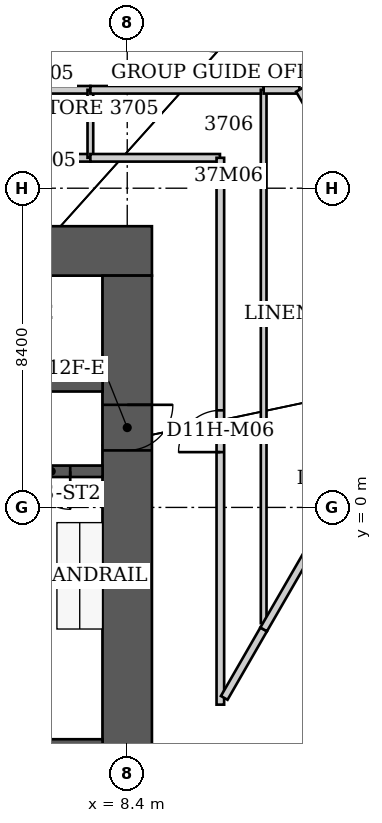
"""IFC4 building model, lengths in metres.
Left out: names, types, materials, properties, quantities, classifications, styles, units other than length and angle.
Written with IfcOpenShell. Run it as: python <this file> out.ifc"""

import sys

from ifc_helpers import new_model, si_unit, direction, frame, frame_2d, origin, place, context, subcontext, project, spatial, rectangle, extrude, element, fill, save


model = new_model("IFC4")
c1 = context("Model", 3, precision=1e-05, world=origin(), true_north=direction((0.0, 1.0)))
c2 = subcontext(c1, "Body", "Model", "MODEL_VIEW")
j1 = project(units=[si_unit("LENGTHUNIT", "METRE"), si_unit("PLANEANGLEUNIT", "RADIAN")], contexts=[c1])
p1 = place(None, origin())
s1 = spatial("IfcSite", under=j1, at=p1, CompositionType="ELEMENT")
p2 = place(p1, origin())
s2 = spatial("IfcBuilding", under=s1, at=p2, CompositionType="ELEMENT")
p3 = place(p2, frame((0.0, 0.0, 150.0)))
s3 = spatial("IfcBuildingStorey", under=s2, at=p3, CompositionType="ELEMENT", Elevation=150.0)
p4 = place(p3, frame((-9.05, 6.75, 0.0), z_axis=(0.0, 0.0, 1.0), x_axis=(1.0, 0.0, 0.0)))
e1 = element("IfcWall", 1, at=p4, inside=s3, PredefinedType="SHEAR", context=c2, shape_type="SweptSolid", body=[
    extrude(rectangle(XDim=18.1, YDim=1.3, at=frame_2d((9.05, 0.0))), origin(), (0.0, 0.0, 1.0), 3.8),
])
p5 = place(p3, frame((8.4, -9.2, 0.0), z_axis=(0.0, 0.0, 1.0), x_axis=(0.0, 1.0, 0.0)))
e2 = element("IfcWall", 2, at=p5, inside=s3, PredefinedType="SHEAR", context=c2, shape_type="SweptSolid", body=[
    extrude(rectangle(XDim=15.3, YDim=1.3, at=frame_2d((7.65, 0.0))), origin(), (0.0, 0.0, 1.0), 3.8),
])
p6 = place(p5, frame((10.7, 0.0, 0.0)))
e3 = element("IfcOpeningElement", 3, at=p6, cuts=e2, PredefinedType="OPENING", context=c2, shape_type="SweptSolid", body=[
    extrude(rectangle(XDim=1.2, YDim=2.2, at=frame_2d((0.6, 1.1))), frame((0.0, 0.65, 0.0), z_axis=(0.0, -1.0, 0.0), x_axis=(1.0, 0.0, 0.0)), (0.0, 0.0, 1.0), 1.3),
])
p7 = place(p3, frame((-7.75, -6.5, 0.0), z_axis=(0.0, 0.0, 1.0), x_axis=(1.0, 0.0, 0.0)))
e4 = element("IfcWall", 4, at=p7, inside=s3, PredefinedType="SHEAR", context=c2, shape_type="SweptSolid", body=[
    extrude(rectangle(XDim=15.5, YDim=0.8, at=frame_2d((7.75, 0.0))), origin(), (0.0, 0.0, 1.0), 3.8),
])
p8 = place(p3, frame((4.75, 0.95, 0.0), z_axis=(0.0, 0.0, 1.0), x_axis=(1.0, 0.0, 0.0)))
e5 = element("IfcWall", 5, at=p8, inside=s3, PredefinedType="SHEAR", context=c2, shape_type="SweptSolid", body=[
    extrude(rectangle(XDim=3.0, YDim=0.3, at=frame_2d((1.5, 0.0))), origin(), (0.0, 0.0, 1.0), 3.8),
])
p9 = place(p8, frame((1.15, 0.0, 0.0)))
e6 = element("IfcOpeningElement", 6, at=p9, cuts=e5, PredefinedType="OPENING", context=c2, shape_type="SweptSolid", body=[
    extrude(rectangle(XDim=1.0, YDim=2.2, at=frame_2d((0.5, 1.1))), frame((0.0, 0.15, 0.0), z_axis=(0.0, -1.0, 0.0), x_axis=(1.0, 0.0, 0.0)), (0.0, 0.0, 1.0), 0.3),
])
p10 = place(p3, frame((-7.75, 3.2, 0.0), z_axis=(0.0, 0.0, 1.0), x_axis=(1.0, 0.0, 0.0)))
e7 = element("IfcWall", 7, at=p10, inside=s3, PredefinedType="SHEAR", context=c2, shape_type="SweptSolid", body=[
    extrude(rectangle(XDim=15.5, YDim=0.3, at=frame_2d((7.75, 0.0))), origin(), (0.0, 0.0, 1.0), 3.8),
])
p11 = place(p10, frame((5.944, 0.0, 0.0)))
e8 = element("IfcOpeningElement", 8, at=p11, cuts=e7, PredefinedType="OPENING", context=c2, shape_type="SweptSolid", body=[
    extrude(rectangle(XDim=1.1, YDim=2.2, at=frame_2d((0.55, 1.1))), frame((0.0, 0.15, 0.0), z_axis=(0.0, -1.0, 0.0), x_axis=(1.0, 0.0, 0.0)), (0.0, 0.0, 1.0), 0.3),
])
p12 = place(p10, frame((11.144, 0.0, 0.0)))
e9 = element("IfcOpeningElement", 9, at=p12, cuts=e7, PredefinedType="OPENING", context=c2, shape_type="SweptSolid", body=[
    extrude(rectangle(XDim=1.1, YDim=2.2, at=frame_2d((0.55, 1.1))), frame((0.0, 0.15, 0.0), z_axis=(0.0, -1.0, 0.0), x_axis=(1.0, 0.0, 0.0)), (0.0, 0.0, 1.0), 0.3),
])
p13 = place(p3, frame((2.86, 10.99, 0.0), z_axis=(0.0, 0.0, 1.0), x_axis=(1.0, 0.0, 0.0)))
e10 = element("IfcWall", 10, at=p13, inside=s3, PredefinedType="PARTITIONING", context=c2, shape_type="SweptSolid", body=[
    extrude(rectangle(XDim=4.57, YDim=0.2, at=frame_2d((2.285, 0.0))), origin(), (0.0, 0.0, 1.0), 3.64),
])
p14 = place(p13, frame((1.735, 0.0, 0.0)))
e11 = element("IfcOpeningElement", 11, at=p14, cuts=e10, PredefinedType="OPENING", context=c2, shape_type="SweptSolid", body=[
    extrude(rectangle(XDim=1.1, YDim=2.2, at=frame_2d((0.55, 1.1))), frame((0.0, 0.1, 0.0), z_axis=(0.0, -1.0, 0.0), x_axis=(1.0, 0.0, 0.0)), (0.0, 0.0, 1.0), 0.2),
])
p15 = place(p3, frame((7.43, 9.2, 0.0), z_axis=(0.0, 0.0, 1.0), x_axis=(-1.0, 0.0, 0.0)))
e12 = element("IfcWall", 12, at=p15, inside=s3, PredefinedType="PARTITIONING", context=c2, shape_type="SweptSolid", body=[
    extrude(rectangle(XDim=4.57, YDim=0.2, at=frame_2d((2.285, 0.0))), origin(), (0.0, 0.0, 1.0), 3.64),
])
p16 = place(p3, frame((7.43, 10.99, 0.0), z_axis=(0.0, 0.0, 1.0), x_axis=(0.0, -1.0, 0.0)))
e13 = element("IfcWall", 13, at=p16, inside=s3, PredefinedType="PARTITIONING", context=c2, shape_type="SweptSolid", body=[
    extrude(rectangle(XDim=1.79, YDim=0.15, at=frame_2d((0.895, 0.0))), origin(), (0.0, 0.0, 1.0), 3.64),
])
p17 = place(p3, frame((7.43, 10.99, 0.0), z_axis=(0.0, 0.0, 1.0), x_axis=(1.0, 0.0, 0.0)))
e14 = element("IfcWall", 14, at=p17, inside=s3, PredefinedType="PARTITIONING", context=c2, shape_type="SweptSolid", body=[
    extrude(rectangle(XDim=4.56, YDim=0.2, at=frame_2d((2.28, 0.0))), origin(), (0.0, 0.0, 1.0), 3.64),
])
p18 = place(p3, frame((10.84, 9.2, 0.0), z_axis=(0.0, 0.0, 1.0), x_axis=(-1.0, 0.0, 0.0)))
e15 = element("IfcWall", 15, at=p18, inside=s3, PredefinedType="PARTITIONING", context=c2, shape_type="SweptSolid", body=[
    extrude(rectangle(XDim=3.41, YDim=0.2, at=frame_2d((1.705, 0.0))), origin(), (0.0, 0.0, 1.0), 3.64),
])
p19 = place(p3, frame((10.85, -5.19, 0.0), z_axis=(0.0, 0.0, 1.0), x_axis=(0.0, 1.0, 0.0)))
e16 = element("IfcWall", 16, at=p19, inside=s3, PredefinedType="PARTITIONING", context=c2, shape_type="SweptSolid", body=[
    extrude(rectangle(XDim=14.39, YDim=0.2, at=frame_2d((7.195, 0.0))), origin(), (0.0, 0.0, 1.0), 3.64),
])
p20 = place(p19, frame((6.645, 0.0, 0.0)))
e17 = element("IfcOpeningElement", 17, at=p20, cuts=e16, PredefinedType="OPENING", context=c2, shape_type="SweptSolid", body=[
    extrude(rectangle(XDim=1.1, YDim=2.2, at=frame_2d((0.55, 1.1))), frame((0.0, 0.1, 0.0), z_axis=(0.0, -1.0, 0.0), x_axis=(1.0, 0.0, 0.0)), (0.0, 0.0, 1.0), 0.2),
])
p21 = place(p3, frame((11.99, -3.21, 0.0), z_axis=(0.0, 0.0, 1.0), x_axis=(-0.498943070116, -0.866634763198, 0.0)))
e18 = element("IfcWall", 18, at=p21, inside=s3, PredefinedType="PARTITIONING", context=c2, shape_type="SweptSolid", body=[
    extrude(rectangle(XDim=2.08, YDim=0.2, at=frame_2d((1.04, 0.0))), origin(), (0.0, 0.0, 1.0), 3.64),
])
p22 = place(p3, frame((11.99, 10.99, 0.0), z_axis=(0.0, 0.0, 1.0), x_axis=(0.0, -1.0, 0.0)))
e19 = element("IfcWall", 19, at=p22, inside=s3, PredefinedType="PARTITIONING", context=c2, shape_type="SweptSolid", body=[
    extrude(rectangle(XDim=14.035, YDim=0.15, at=frame_2d((7.018, 0.0))), origin(), (0.0, 0.0, 1.0), 3.64),
])
p23 = place(p3, frame((11.99, 10.99, 0.0), z_axis=(0.0, 0.0, 1.0), x_axis=(1.0, 0.0, 0.0)))
e20 = element("IfcWall", 20, at=p23, inside=s3, PredefinedType="PARTITIONING", context=c2, shape_type="SweptSolid", body=[
    extrude(rectangle(XDim=0.94, YDim=0.2, at=frame_2d((0.47, 0.0))), origin(), (0.0, 0.0, 1.0), 3.64),
])
p24 = place(p3, frame((12.93, 10.99, 0.0), z_axis=(0.0, 0.0, 1.0), x_axis=(0.4998524389, -0.866110581465, 0.0)))
e21 = element("IfcWall", 21, at=p24, inside=s3, PredefinedType="PARTITIONING", context=c2, shape_type="SweptSolid", body=[
    extrude(rectangle(XDim=7.262, YDim=0.2, at=frame_2d((3.631, 0.0))), origin(), (0.0, 0.0, 1.0), 3.64),
])
p25 = place(p3, frame((16.56, 4.7, 0.0), z_axis=(0.0, 0.0, 1.0), x_axis=(-0.500269138002, -0.865869961116, 0.0)))
e22 = element("IfcWall", 22, at=p25, inside=s3, PredefinedType="PARTITIONING", context=c2, shape_type="SweptSolid", body=[
    extrude(rectangle(XDim=9.135, YDim=0.2, at=frame_2d((4.568, 0.0))), origin(), (0.0, 0.0, 1.0), 3.64),
])
p26 = place(p25, frame((4.018, 0.0, 0.0)))
e23 = element("IfcOpeningElement", 23, at=p26, cuts=e22, PredefinedType="OPENING", context=c2, shape_type="SweptSolid", body=[
    extrude(rectangle(XDim=1.1, YDim=2.2, at=frame_2d((0.55, 1.1))), frame((0.0, 0.1, 0.0), z_axis=(0.0, -1.0, 0.0), x_axis=(1.0, 0.0, 0.0)), (0.0, 0.0, 1.0), 0.2),
])
p27 = place(p20, origin())
e24 = element("IfcDoor", 24, at=p27, inside=s3, OperationType="SINGLE_SWING_LEFT", PredefinedType="DOOR", context=c2, shape_type="SweptSolid", body=[
    extrude(rectangle(XDim=1.1, YDim=2.2, at=frame_2d((0.55, 1.1))), frame((0.0, 0.025, 0.0), z_axis=(0.0, -1.0, 0.0), x_axis=(1.0, 0.0, 0.0)), (0.0, 0.0, 1.0), 0.05),
])
fill(e17, e24)
p28 = place(p9, origin())
e25 = element("IfcDoor", 25, at=p28, inside=s3, OperationType="SINGLE_SWING_RIGHT", PredefinedType="DOOR", context=c2, shape_type="SweptSolid", body=[
    extrude(rectangle(XDim=1.0, YDim=2.2, at=frame_2d((0.5, 1.1))), frame((0.0, 0.025, 0.0), z_axis=(0.0, -1.0, 0.0), x_axis=(1.0, 0.0, 0.0)), (0.0, 0.0, 1.0), 0.05),
])
fill(e6, e25)
p29 = place(p6, origin())
e26 = element("IfcDoor", 26, at=p29, inside=s3, OperationType="SINGLE_SWING_RIGHT", PredefinedType="DOOR", context=c2, shape_type="SweptSolid", body=[
    extrude(rectangle(XDim=1.2, YDim=2.2, at=frame_2d((0.6, 1.1))), frame((0.0, 0.025, 0.0), z_axis=(0.0, -1.0, 0.0), x_axis=(1.0, 0.0, 0.0)), (0.0, 0.0, 1.0), 0.05),
])
fill(e3, e26)
save(model, sys.argv[1])
